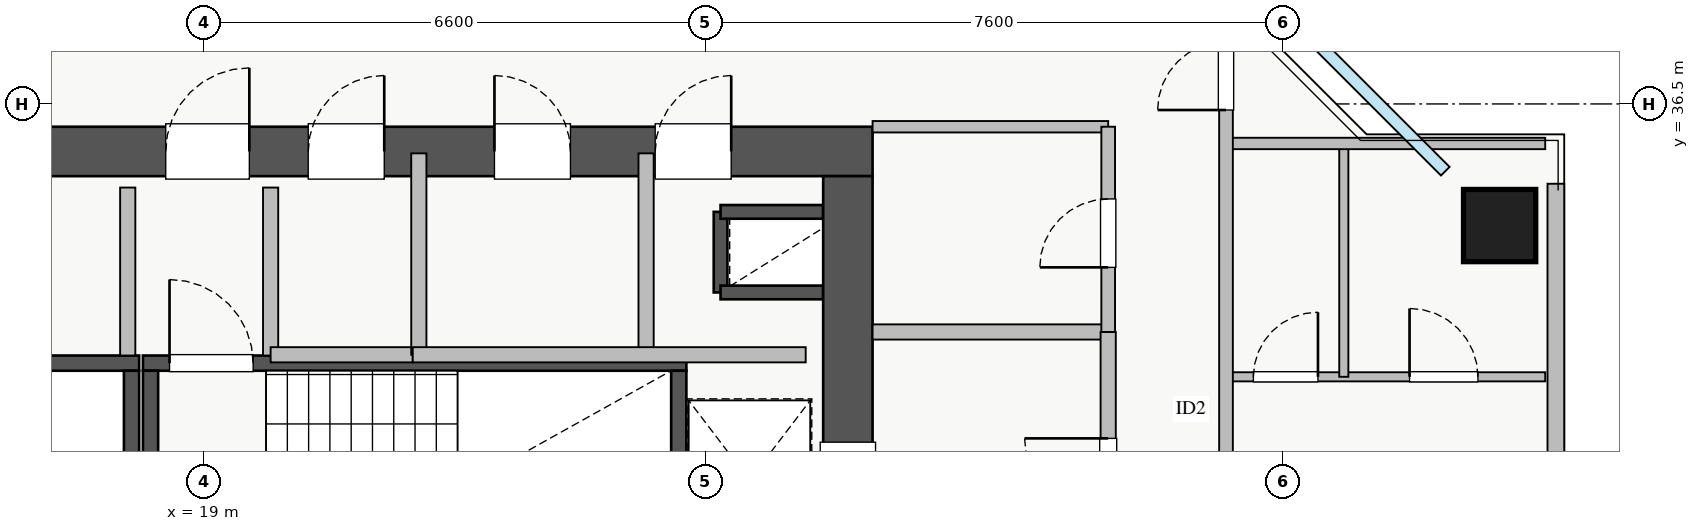
"""IFC4 building model, lengths in metres.
Left out: names, types, materials, properties, quantities, classifications, styles, units other than length and angle.
Written with IfcOpenShell. Run it as: python <this file> out.ifc"""

import sys

from ifc_helpers import new_model, si_unit, direction, frame, frame_2d, origin, origin_2d, place, context, subcontext, project, spatial, rectangle, extrude, source, transform, mapped, element, fill, save


model = new_model("IFC4")
c1 = context("Model", 3, precision=1e-05, world=origin(), true_north=direction((0.0, 1.0)))
c2 = subcontext(c1, "Body", "Model", "MODEL_VIEW")
j1 = project(units=[si_unit("LENGTHUNIT", "METRE"), si_unit("PLANEANGLEUNIT", "RADIAN")], contexts=[c1])
p1 = place(None, origin())
s1 = spatial("IfcSite", under=j1, at=p1, CompositionType="ELEMENT")
p2 = place(p1, origin())
s2 = spatial("IfcBuilding", under=s1, at=p2, CompositionType="ELEMENT")
p3 = place(p2, frame((0.0, 0.0, 156.75)))
s3 = spatial("IfcBuildingStorey", under=s2, at=p3, CompositionType="ELEMENT", Elevation=156.75)
p4 = place(p3, frame((25.8, 34.02, 0.0), z_axis=(0.0, 0.0, 1.0), x_axis=(0.0, 1.0, 0.0)))
e1 = element("IfcWall", 1, at=p4, inside=s3, PredefinedType="SHEAR", context=c2, shape_type="SweptSolid", body=[
    extrude(rectangle(XDim=1.06, YDim=0.18, at=frame_2d((0.53, 0.0))), origin(), (0.0, 0.0, 1.0), 3.07),
])
for number, where, z_axis, x_axis in (
    (2, (25.8, 35.08, 0.0), (0.0, 0.0, 1.0), (1.0, 0.0, 0.0)),
    (3, (25.8, 34.02, 0.0), (0.0, 0.0, 1.0), (1.0, 0.0, 0.0)),
):
    element("IfcWall", number, at=place(p3, frame(where, z_axis=z_axis, x_axis=x_axis)), inside=s3, PredefinedType="SHEAR", context=c2, shape_type="SweptSolid", body=[
        extrude(rectangle(XDim=1.35, YDim=0.18, at=frame_2d((0.675, 0.0))), origin(), (0.0, 0.0, 1.0), 3.07),
    ])
p5 = place(p3, frame((10.85, 33.09, 0.0), z_axis=(0.0, 0.0, 1.0), x_axis=(1.0, 0.0, 0.0)))
e4 = element("IfcWall", 4, at=p5, inside=s3, PredefinedType="SHEAR", context=c2, shape_type="SweptSolid", body=[
    extrude(rectangle(XDim=7.3, YDim=0.2, at=frame_2d((3.65, 0.0))), origin(), (0.0, 0.0, 1.0), 3.25),
])
p6 = place(p5, frame((0.35, 0.0, 0.0)))
e5 = element("IfcOpeningElement", 5, at=p6, cuts=e4, PredefinedType="OPENING", context=c2, shape_type="SweptSolid", body=[
    extrude(rectangle(XDim=1.1, YDim=2.05, at=frame_2d((0.55, 1.025))), frame((0.0, 0.11, 0.0), z_axis=(0.0, -1.0, 0.0), x_axis=(1.0, 0.0, 0.0)), (0.0, 0.0, 1.0), 0.22),
])
p7 = place(p3, frame((18.05, 30.05, 0.0), z_axis=(0.0, 0.0, 1.0), x_axis=(0.0, 1.0, 0.0)))
e6 = element("IfcWall", 6, at=p7, inside=s3, PredefinedType="SHEAR", context=c2, shape_type="SweptSolid", body=[
    extrude(rectangle(XDim=2.94, YDim=0.2, at=frame_2d((1.47, 0.0))), origin(), (0.0, 0.0, 1.0), 3.25),
])
p8 = place(p3, frame((18.2, 33.09, 0.0), z_axis=(0.0, 0.0, 1.0), x_axis=(1.0, 0.0, 0.0)))
e7 = element("IfcWall", 7, at=p8, inside=s3, PredefinedType="SHEAR", context=c2, shape_type="SweptSolid", body=[
    extrude(rectangle(XDim=7.15, YDim=0.2, at=frame_2d((3.575, 0.0))), origin(), (0.0, 0.0, 1.0), 3.25),
])
p9 = place(p8, frame((0.35, 0.0, 0.0)))
e8 = element("IfcOpeningElement", 8, at=p9, cuts=e7, PredefinedType="OPENING", context=c2, shape_type="SweptSolid", body=[
    extrude(rectangle(XDim=1.1, YDim=2.05, at=frame_2d((0.55, 1.025))), frame((0.0, 0.11, 0.0), z_axis=(0.0, -1.0, 0.0), x_axis=(1.0, 0.0, 0.0)), (0.0, 0.0, 1.0), 0.22),
])
for number, where, z_axis, x_axis in (
    (9, (18.3, 30.05, 0.0), (0.0, 0.0, 1.0), (0.0, 1.0, 0.0)),
    (10, (25.25, 30.05, 0.0), (0.0, 0.0, 1.0), (0.0, 1.0, 0.0)),
):
    element("IfcWall", number, at=place(p3, frame(where, z_axis=z_axis, x_axis=x_axis)), inside=s3, PredefinedType="SHEAR", context=c2, shape_type="SweptSolid", body=[
        extrude(rectangle(XDim=2.94, YDim=0.2, at=frame_2d((1.47, 0.0))), origin(), (0.0, 0.0, 1.0), 3.25),
    ])
p10 = place(p3, frame((10.2, 35.875, 0.0), z_axis=(0.0, 0.0, 1.0), x_axis=(1.0, 0.0, 0.0)))
e11 = element("IfcWall", 11, at=p10, inside=s3, PredefinedType="SHEAR", context=c2, shape_type="SweptSolid", body=[
    extrude(rectangle(XDim=17.6, YDim=0.65, at=frame_2d((8.8, 0.0))), origin(), (0.0, 0.0, 1.0), 3.25),
])
p11 = place(p10, frame((1.15, 0.0, 0.0)))
e12 = element("IfcOpeningElement", 12, at=p11, cuts=e11, PredefinedType="OPENING", context=c2, shape_type="SweptSolid", body=[
    extrude(rectangle(XDim=1.1, YDim=2.05, at=frame_2d((0.55, 1.025))), frame((0.0, 0.335, 0.0), z_axis=(0.0, -1.0, 0.0), x_axis=(1.0, 0.0, 0.0)), (0.0, 0.0, 1.0), 0.67),
])
p12 = place(p10, frame((8.3, 0.0, 0.0)))
e13 = element("IfcOpeningElement", 13, at=p12, cuts=e11, PredefinedType="OPENING", context=c2, shape_type="SweptSolid", body=[
    extrude(rectangle(XDim=1.1, YDim=2.05, at=frame_2d((0.55, 1.025))), frame((0.0, 0.335, 0.0), z_axis=(0.0, -1.0, 0.0), x_axis=(1.0, 0.0, 0.0)), (0.0, 0.0, 1.0), 0.67),
])
p13 = place(p10, frame((4.9, 0.0, 0.0)))
e14 = element("IfcOpeningElement", 14, at=p13, cuts=e11, PredefinedType="OPENING", context=c2, shape_type="SweptSolid", body=[
    extrude(rectangle(XDim=1.1, YDim=2.05, at=frame_2d((0.55, 1.025))), frame((0.0, 0.335, 0.0), z_axis=(0.0, -1.0, 0.0), x_axis=(1.0, 0.0, 0.0)), (0.0, 0.0, 1.0), 0.67),
])
p14 = place(p10, frame((14.74, 0.0, 0.0)))
e15 = element("IfcOpeningElement", 15, at=p14, cuts=e11, PredefinedType="OPENING", context=c2, shape_type="SweptSolid", body=[
    extrude(rectangle(XDim=1.0, YDim=2.05, at=frame_2d((0.5, 1.025))), frame((0.0, 0.335, 0.0), z_axis=(0.0, -1.0, 0.0), x_axis=(1.0, 0.0, 0.0)), (0.0, 0.0, 1.0), 0.67),
])
p15 = place(p10, frame((10.175, 0.0, 0.0)))
e16 = element("IfcOpeningElement", 16, at=p15, cuts=e11, PredefinedType="OPENING", context=c2, shape_type="SweptSolid", body=[
    extrude(rectangle(XDim=1.0, YDim=2.05, at=frame_2d((0.5, 1.025))), frame((0.0, 0.335, 0.0), z_axis=(0.0, -1.0, 0.0), x_axis=(1.0, 0.0, 0.0)), (0.0, 0.0, 1.0), 0.67),
])
p16 = place(p10, frame((12.625, 0.0, 0.0)))
e17 = element("IfcOpeningElement", 17, at=p16, cuts=e11, PredefinedType="OPENING", context=c2, shape_type="SweptSolid", body=[
    extrude(rectangle(XDim=1.0, YDim=2.05, at=frame_2d((0.5, 1.025))), frame((0.0, 0.335, 0.0), z_axis=(0.0, -1.0, 0.0), x_axis=(1.0, 0.0, 0.0)), (0.0, 0.0, 1.0), 0.67),
])
p17 = place(p3, frame((27.475, 29.65, 0.0), z_axis=(0.0, 0.0, 1.0), x_axis=(0.0, 1.0, 0.0)))
e18 = element("IfcWall", 18, at=p17, inside=s3, PredefinedType="SHEAR", context=c2, shape_type="SweptSolid", body=[
    extrude(rectangle(XDim=5.9, YDim=0.65, at=frame_2d((2.95, 0.0))), origin(), (0.0, 0.0, 1.0), 3.25),
])
p18 = place(p17, frame((1.1, 0.0, 0.0)))
e19 = element("IfcOpeningElement", 19, at=p18, cuts=e18, PredefinedType="OPENING", context=c2, shape_type="SweptSolid", body=[
    extrude(rectangle(XDim=1.3, YDim=2.05, at=frame_2d((0.65, 1.025))), frame((0.0, 0.335, 0.0), z_axis=(0.0, -1.0, 0.0), x_axis=(1.0, 0.0, 0.0)), (0.0, 0.0, 1.0), 0.67),
])
m1 = source(origin(), c2, "Body", "SweptSolid", [
    extrude(rectangle(XDim=0.95, YDim=0.95, at=origin_2d()), origin(), (0.0, 0.0, 1.0), 3.25),
])
p19 = place(p3, frame((36.05, 34.9, 0.0), z_axis=(0.0, 0.0, 1.0), x_axis=(1.0, 0.0, 0.0)))
e20 = element("IfcColumn", 20, at=p19, inside=s3, PredefinedType="COLUMN", context=c2, shape_type="MappedRepresentation", body=[
    mapped(m1, transform((0.0, 0.0, 0.0), x_axis=(1.0, 0.0, 0.0), y_axis=(0.0, 1.0, 0.0), z_axis=(0.0, 0.0, 1.0), scale=1.0)),
])
p20 = place(p3, frame((36.79, 29.15, 0.0), z_axis=(0.0, 0.0, 1.0), x_axis=(0.0, 1.0, 0.0)))
e21 = element("IfcWall", 21, at=p20, inside=s3, PredefinedType="STANDARD", context=c2, shape_type="SweptSolid", body=[
    extrude(rectangle(XDim=6.3, YDim=0.22, at=frame_2d((3.15, 0.0))), origin(), (0.0, 0.0, 1.0), 2.61),
])
p21 = place(p3, frame((27.8, 33.5, 0.0), z_axis=(0.0, 0.0, 1.0), x_axis=(1.0, 0.0, 0.0)))
e22 = element("IfcWall", 22, at=p21, inside=s3, PredefinedType="PARTITIONING", context=c2, shape_type="SweptSolid", body=[
    extrude(rectangle(XDim=3.1, YDim=0.2, at=frame_2d((1.55, 0.0))), origin(), (0.0, 0.0, 1.0), 3.07),
])
p22 = place(p3, frame((30.9, 29.6, 0.0), z_axis=(0.0, 0.0, 1.0), x_axis=(0.0, 1.0, 0.0)))
e23 = element("IfcWall", 23, at=p22, inside=s3, PredefinedType="PARTITIONING", context=c2, shape_type="SweptSolid", body=[
    extrude(rectangle(XDim=3.9, YDim=0.2, at=frame_2d((1.95, 0.0))), origin(), (0.0, 0.0, 1.0), 3.07),
])
p23 = place(p22, frame((1.4, 0.0, 0.0)))
e24 = element("IfcOpeningElement", 24, at=p23, cuts=e23, PredefinedType="OPENING", context=c2, shape_type="SweptSolid", body=[
    extrude(rectangle(XDim=1.1, YDim=2.05, at=frame_2d((0.55, 1.025))), frame((0.0, 0.11, 0.0), z_axis=(0.0, -1.0, 0.0), x_axis=(1.0, 0.0, 0.0)), (0.0, 0.0, 1.0), 0.22),
])
for number, where, z_axis, x_axis in (
    (25, (18.0, 33.19, 0.0), (0.0, 0.0, 1.0), (0.0, 1.0, 0.0)),
    (26, (19.88, 33.19, 0.0), (0.0, 0.0, 1.0), (0.0, 1.0, 0.0)),
):
    element("IfcWall", number, at=place(p3, frame(where, z_axis=z_axis, x_axis=x_axis)), inside=s3, PredefinedType="PARTITIONING", context=c2, shape_type="SweptSolid", body=[
        extrude(rectangle(XDim=2.21, YDim=0.2, at=frame_2d((1.105, 0.0))), origin(), (0.0, 0.0, 1.0), 3.07),
    ])
p24 = place(p3, frame((24.82, 33.2, 0.0), z_axis=(0.0, 0.0, 1.0), x_axis=(0.0, 1.0, 0.0)))
e27 = element("IfcWall", 27, at=p24, inside=s3, PredefinedType="PARTITIONING", context=c2, shape_type="SweptSolid", body=[
    extrude(rectangle(XDim=2.65, YDim=0.2, at=frame_2d((1.325, 0.0))), origin(), (0.0, 0.0, 1.0), 3.07),
])
p25 = place(p3, frame((19.88, 33.2, 0.0), z_axis=(0.0, 0.0, 1.0), x_axis=(1.0, 0.0, 0.0)))
e28 = element("IfcWall", 28, at=p25, inside=s3, PredefinedType="PARTITIONING", context=c2, shape_type="SweptSolid", body=[
    extrude(rectangle(XDim=1.87, YDim=0.2, at=frame_2d((0.935, 0.0))), origin(), (0.0, 0.0, 1.0), 3.07),
])
p26 = place(p3, frame((21.83, 33.2, 0.0), z_axis=(0.0, 0.0, 1.0), x_axis=(0.0, 1.0, 0.0)))
e29 = element("IfcWall", 29, at=p26, inside=s3, PredefinedType="PARTITIONING", context=c2, shape_type="SweptSolid", body=[
    extrude(rectangle(XDim=2.65, YDim=0.2, at=frame_2d((1.325, 0.0))), origin(), (0.0, 0.0, 1.0), 3.07),
])
p27 = place(p3, frame((21.75, 33.2, 0.0), z_axis=(0.0, 0.0, 1.0), x_axis=(1.0, 0.0, 0.0)))
e30 = element("IfcWall", 30, at=p27, inside=s3, PredefinedType="PARTITIONING", context=c2, shape_type="SweptSolid", body=[
    extrude(rectangle(XDim=5.17, YDim=0.2, at=frame_2d((2.585, 0.0))), origin(), (0.0, 0.0, 1.0), 3.07),
])
p28 = place(p3, frame((27.8, 36.2, 0.0), z_axis=(0.0, 0.0, 1.0), x_axis=(1.0, 0.0, 0.0)))
e31 = element("IfcWall", 31, at=p28, inside=s3, PredefinedType="PARTITIONING", context=c2, shape_type="SweptSolid", body=[
    extrude(rectangle(XDim=3.1, YDim=0.15, at=frame_2d((1.55, 0.0))), origin(), (0.0, 0.0, 1.0), 3.07),
])
p29 = place(p3, frame((30.9, 33.5, 0.0), z_axis=(0.0, 0.0, 1.0), x_axis=(0.0, 1.0, 0.0)))
e32 = element("IfcWall", 32, at=p29, inside=s3, PredefinedType="PARTITIONING", context=c2, shape_type="SweptSolid", body=[
    extrude(rectangle(XDim=2.7, YDim=0.18, at=frame_2d((1.35, 0.0))), origin(), (0.0, 0.0, 1.0), 2.577),
])
p30 = place(p29, frame((0.85, 0.0, 0.0)))
e33 = element("IfcOpeningElement", 33, at=p30, cuts=e32, PredefinedType="OPENING", context=c2, shape_type="SweptSolid", body=[
    extrude(rectangle(XDim=0.9, YDim=2.05, at=frame_2d((0.45, 1.025))), frame((0.0, 0.1, 0.0), z_axis=(0.0, -1.0, 0.0), x_axis=(1.0, 0.0, 0.0)), (0.0, 0.0, 1.0), 0.2),
])
p31 = place(p3, frame((32.45, 32.91, 0.0), z_axis=(0.0, 0.0, 1.0), x_axis=(1.0, 0.0, 0.0)))
e34 = element("IfcWall", 34, at=p31, inside=s3, PredefinedType="PLUMBINGWALL", context=c2, shape_type="SweptSolid", body=[
    extrude(rectangle(XDim=4.2, YDim=0.12, at=frame_2d((2.1, 0.0))), origin(), (0.0, 0.0, 1.0), 3.07),
])
p32 = place(p31, frame((0.36, 0.0, 0.0)))
e35 = element("IfcOpeningElement", 35, at=p32, cuts=e34, PredefinedType="OPENING", context=c2, shape_type="SweptSolid", body=[
    extrude(rectangle(XDim=0.85, YDim=2.05, at=frame_2d((0.425, 1.025))), frame((0.0, 0.07, 0.0), z_axis=(0.0, -1.0, 0.0), x_axis=(1.0, 0.0, 0.0)), (0.0, 0.0, 1.0), 0.14),
])
p33 = place(p31, frame((2.415, 0.0, 0.0)))
e36 = element("IfcOpeningElement", 36, at=p33, cuts=e34, PredefinedType="OPENING", context=c2, shape_type="SweptSolid", body=[
    extrude(rectangle(XDim=0.9, YDim=2.05, at=frame_2d((0.45, 1.025))), frame((0.0, 0.07, 0.0), z_axis=(0.0, -1.0, 0.0), x_axis=(1.0, 0.0, 0.0)), (0.0, 0.0, 1.0), 0.14),
])
p34 = place(p3, frame((34.0, 32.91, 0.0), z_axis=(0.0, 0.0, 1.0), x_axis=(0.0, 1.0, 0.0)))
e37 = element("IfcWall", 37, at=p34, inside=s3, PredefinedType="PLUMBINGWALL", context=c2, shape_type="SweptSolid", body=[
    extrude(rectangle(XDim=3.07, YDim=0.12, at=frame_2d((1.535, 0.0))), origin(), (0.0, 0.0, 1.0), 3.07),
])
p35 = place(p3, frame((32.45, 35.98, 0.0), z_axis=(0.0, 0.0, 1.0), x_axis=(1.0, 0.0, 0.0)))
e38 = element("IfcWall", 38, at=p35, inside=s3, PredefinedType="PARTITIONING", context=c2, shape_type="SweptSolid", body=[
    extrude(rectangle(XDim=4.2, YDim=0.15, at=frame_2d((2.1, 0.0))), origin(), (0.0, 0.0, 1.0), 3.07),
])
p36 = place(p3, frame((32.45, 29.3, 0.0), z_axis=(0.0, 0.0, 1.0), x_axis=(0.0, 1.0, 0.0)))
e39 = element("IfcWall", 39, at=p36, inside=s3, PredefinedType="PARTITIONING", context=c2, shape_type="SweptSolid", body=[
    extrude(rectangle(XDim=11.35, YDim=0.18, at=frame_2d((5.675, 0.0))), origin(), (0.0, 0.0, 1.0), 3.07),
])
p37 = place(p36, frame((1.115, 0.0, 0.0)))
e40 = element("IfcOpeningElement", 40, at=p37, cuts=e39, PredefinedType="OPENING", context=c2, shape_type="SweptSolid", body=[
    extrude(rectangle(XDim=1.0, YDim=2.05, at=frame_2d((0.5, 1.025))), frame((0.0, 0.1, 0.0), z_axis=(0.0, -1.0, 0.0), x_axis=(1.0, 0.0, 0.0)), (0.0, 0.0, 1.0), 0.2),
])
p38 = place(p36, frame((7.12, 0.0, 0.0)))
e41 = element("IfcOpeningElement", 41, at=p38, cuts=e39, PredefinedType="OPENING", context=c2, shape_type="SweptSolid", body=[
    extrude(rectangle(XDim=0.9, YDim=2.05, at=frame_2d((0.45, 1.025))), frame((0.0, 0.1, 0.0), z_axis=(0.0, -1.0, 0.0), x_axis=(1.0, 0.0, 0.0)), (0.0, 0.0, 1.0), 0.2),
])
m2 = source(origin(), c2, "Body", "SweptSolid", [
    extrude(rectangle(XDim=1.3, YDim=2.05, at=frame_2d((0.65, 1.025))), frame((0.0, 0.025, 0.0), z_axis=(0.0, -1.0, 0.0), x_axis=(1.0, 0.0, 0.0)), (0.0, 0.0, 1.0), 0.05),
])
p39 = place(p18, origin())
e42 = element("IfcDoor", 42, at=p39, inside=s3, OperationType="SLIDING_TO_LEFT", PredefinedType="DOOR", context=c2, shape_type="MappedRepresentation", body=[
    mapped(m2, transform((0.0, 0.0, 0.0), x_axis=(1.0, 0.0, 0.0), y_axis=(0.0, 1.0, 0.0), z_axis=(0.0, 0.0, 1.0), scale=1.0)),
])
fill(e19, e42)
m3 = source(origin(), c2, "Body", "SweptSolid", [
    extrude(rectangle(XDim=1.1, YDim=2.05, at=frame_2d((0.55, 1.025))), frame((0.0, 0.025, 0.0), z_axis=(0.0, -1.0, 0.0), x_axis=(1.0, 0.0, 0.0)), (0.0, 0.0, 1.0), 0.05),
])
p40 = place(p12, origin())
e43 = element("IfcDoor", 43, at=p40, inside=s3, OperationType="SINGLE_SWING_RIGHT", PredefinedType="DOOR", context=c2, shape_type="MappedRepresentation", body=[
    mapped(m3, transform((0.0, 0.0, 0.0), x_axis=(1.0, 0.0, 0.0), y_axis=(0.0, 1.0, 0.0), z_axis=(0.0, 0.0, 1.0), scale=1.0)),
])
fill(e13, e43)
p41 = place(p9, origin())
e44 = element("IfcDoor", 44, at=p41, inside=s3, OperationType="SINGLE_SWING_LEFT", PredefinedType="DOOR", context=c2, shape_type="MappedRepresentation", body=[
    mapped(m3, transform((0.0, 0.0, 0.0), x_axis=(1.0, 0.0, 0.0), y_axis=(0.0, 1.0, 0.0), z_axis=(0.0, 0.0, 1.0), scale=1.0)),
])
fill(e8, e44)
m4 = source(origin(), c2, "Body", "SweptSolid", [
    extrude(rectangle(XDim=1.0, YDim=2.05, at=frame_2d((0.5, 1.025))), frame((0.0, 0.025, 0.0), z_axis=(0.0, -1.0, 0.0), x_axis=(1.0, 0.0, 0.0)), (0.0, 0.0, 1.0), 0.05),
])
p42 = place(p14, origin())
e45 = element("IfcDoor", 45, at=p42, inside=s3, OperationType="SINGLE_SWING_RIGHT", PredefinedType="DOOR", context=c2, shape_type="MappedRepresentation", body=[
    mapped(m4, transform((0.0, 0.0, 0.0), x_axis=(1.0, 0.0, 0.0), y_axis=(0.0, 1.0, 0.0), z_axis=(0.0, 0.0, 1.0), scale=1.0)),
])
fill(e15, e45)
p43 = place(p15, origin())
e46 = element("IfcDoor", 46, at=p43, inside=s3, OperationType="SINGLE_SWING_RIGHT", PredefinedType="DOOR", context=c2, shape_type="MappedRepresentation", body=[
    mapped(m4, transform((0.0, 0.0, 0.0), x_axis=(1.0, 0.0, 0.0), y_axis=(0.0, 1.0, 0.0), z_axis=(0.0, 0.0, 1.0), scale=1.0)),
])
fill(e16, e46)
p44 = place(p16, origin())
e47 = element("IfcDoor", 47, at=p44, inside=s3, OperationType="SINGLE_SWING_LEFT", PredefinedType="DOOR", context=c2, shape_type="MappedRepresentation", body=[
    mapped(m4, transform((0.0, 0.0, 0.0), x_axis=(1.0, 0.0, 0.0), y_axis=(0.0, 1.0, 0.0), z_axis=(0.0, 0.0, 1.0), scale=1.0)),
])
fill(e17, e47)
p45 = place(p23, origin())
e48 = element("IfcDoor", 48, at=p45, inside=s3, OperationType="SINGLE_SWING_RIGHT", PredefinedType="DOOR", context=c2, shape_type="MappedRepresentation", body=[
    mapped(m3, transform((0.0, 0.0, 0.0), x_axis=(1.0, 0.0, 0.0), y_axis=(0.0, 1.0, 0.0), z_axis=(0.0, 0.0, 1.0), scale=1.0)),
])
fill(e24, e48)
m5 = source(origin(), c2, "Body", "SweptSolid", [
    extrude(rectangle(XDim=0.9, YDim=2.05, at=frame_2d((0.45, 1.025))), frame((0.0, 0.025, 0.0), z_axis=(0.0, -1.0, 0.0), x_axis=(1.0, 0.0, 0.0)), (0.0, 0.0, 1.0), 0.05),
])
p46 = place(p30, origin())
e49 = element("IfcDoor", 49, at=p46, inside=s3, OperationType="SINGLE_SWING_LEFT", PredefinedType="DOOR", context=c2, shape_type="MappedRepresentation", body=[
    mapped(m5, transform((0.0, 0.0, 0.0), x_axis=(1.0, 0.0, 0.0), y_axis=(0.0, 1.0, 0.0), z_axis=(0.0, 0.0, 1.0), scale=1.0)),
])
fill(e33, e49)
m6 = source(origin(), c2, "Body", "SweptSolid", [
    extrude(rectangle(XDim=0.85, YDim=2.05, at=frame_2d((0.425, 1.025))), frame((0.0, 0.025, 0.0), z_axis=(0.0, -1.0, 0.0), x_axis=(1.0, 0.0, 0.0)), (0.0, 0.0, 1.0), 0.05),
])
p47 = place(p32, origin())
e50 = element("IfcDoor", 50, at=p47, inside=s3, OperationType="SINGLE_SWING_RIGHT", PredefinedType="DOOR", context=c2, shape_type="MappedRepresentation", body=[
    mapped(m6, transform((0.0, 0.0, 0.0), x_axis=(1.0, 0.0, 0.0), y_axis=(0.0, 1.0, 0.0), z_axis=(0.0, 0.0, 1.0), scale=1.0)),
])
fill(e35, e50)
p48 = place(p33, origin())
e51 = element("IfcDoor", 51, at=p48, inside=s3, OperationType="SINGLE_SWING_LEFT", PredefinedType="DOOR", context=c2, shape_type="MappedRepresentation", body=[
    mapped(m5, transform((0.0, 0.0, 0.0), x_axis=(1.0, 0.0, 0.0), y_axis=(0.0, 1.0, 0.0), z_axis=(0.0, 0.0, 1.0), scale=1.0)),
])
fill(e36, e51)
p49 = place(p38, origin())
e52 = element("IfcDoor", 52, at=p49, inside=s3, OperationType="SINGLE_SWING_LEFT", PredefinedType="DOOR", context=c2, shape_type="MappedRepresentation", body=[
    mapped(m5, transform((0.0, 0.0, 0.0), x_axis=(1.0, 0.0, 0.0), y_axis=(0.0, 1.0, 0.0), z_axis=(0.0, 0.0, 1.0), scale=1.0)),
])
fill(e41, e52)
save(model, sys.argv[1])
